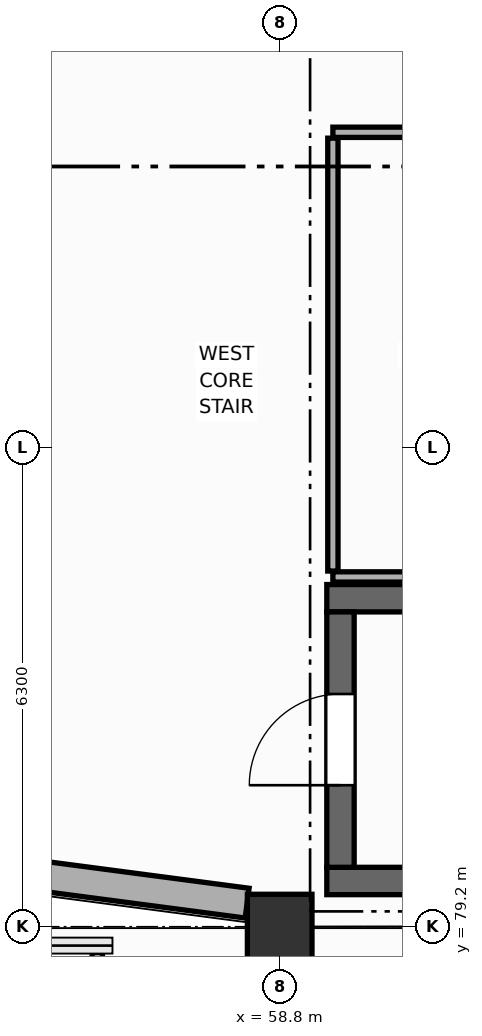
"""IFC4 building model, lengths in metres.
Left out: names, types, materials, properties, quantities, classifications, styles, units other than length and angle.
Written with IfcOpenShell. Run it as: python <this file> out.ifc"""

import sys

from ifc_helpers import new_model, si_unit, direction, frame, frame_2d, origin, origin_2d, place, context, subcontext, project, spatial, rectangle, extrude, element, fill, save


model = new_model("IFC4")
c1 = context("Model", 3, precision=1e-05, world=origin(), true_north=direction((0.0, 1.0)))
c2 = subcontext(c1, "Body", "Model", "MODEL_VIEW")
j1 = project(units=[si_unit("LENGTHUNIT", "METRE"), si_unit("PLANEANGLEUNIT", "RADIAN")], contexts=[c1])
p1 = place(None, origin())
s1 = spatial("IfcSite", under=j1, at=p1, CompositionType="ELEMENT")
p2 = place(p1, origin())
s2 = spatial("IfcBuilding", under=s1, at=p2, CompositionType="ELEMENT")
p3 = place(p2, origin())
s3 = spatial("IfcBuildingStorey", under=s2, at=p3, CompositionType="ELEMENT", Elevation=0.0)
p4 = place(p3, frame((58.8, 79.2, 0.0), z_axis=(0.0, 0.0, 1.0), x_axis=(1.0, 0.0, 0.0)))
e1 = element("IfcColumn", 1, at=p4, inside=s3, PredefinedType="COLUMN", context=c2, shape_type="SweptSolid", body=[
    extrude(rectangle(XDim=0.85, YDim=0.85, at=origin_2d()), origin(), (0.0, 0.0, 1.0), 5.4),
])
p5 = place(p3, frame((55.572, 79.877, 0.0), z_axis=(0.0, 0.0, 1.0), x_axis=(0.991443994311, -0.130532778046, 0.0)))
e2 = element("IfcWall", 2, at=p5, inside=s3, PredefinedType="ELEMENTEDWALL", context=c2, shape_type="SweptSolid", body=[
    extrude(rectangle(XDim=2.824, YDim=0.395, at=frame_2d((1.412, 0.0))), origin(), (0.0, 0.0, 1.0), 4.27),
])
for number, where, z_axis, x_axis in (
    (3, (59.42, 83.52, 0.0), (0.0, 0.0, 1.0), (1.0, 0.0, 0.0)),
    (4, (68.78, 79.8, 0.0), (0.0, 0.0, 1.0), (-1.0, 0.0, 0.0)),
):
    element("IfcWall", number, at=place(p3, frame(where, z_axis=z_axis, x_axis=x_axis)), inside=s3, PredefinedType="SHEAR", context=c2, shape_type="SweptSolid", body=[
        extrude(rectangle(XDim=9.36, YDim=0.36, at=frame_2d((4.68, 0.0))), origin(), (0.0, 0.0, 1.0), 5.14),
    ])
p6 = place(p3, frame((59.6, 79.98, 0.0), z_axis=(0.0, 0.0, 1.0), x_axis=(0.0, 1.0, 0.0)))
e5 = element("IfcWall", 5, at=p6, inside=s3, PredefinedType="SHEAR", context=c2, shape_type="SweptSolid", body=[
    extrude(rectangle(XDim=3.36, YDim=0.36, at=frame_2d((1.68, 0.0))), origin(), (0.0, 0.0, 1.0), 5.14),
])
p7 = place(p6, frame((1.08, 0.0, 0.0)))
e6 = element("IfcOpeningElement", 6, at=p7, cuts=e5, PredefinedType="OPENING", context=c2, shape_type="SweptSolid", body=[
    extrude(rectangle(XDim=1.2, YDim=2.2, at=frame_2d((0.6, 1.1))), frame((0.0, 0.19, 0.0), z_axis=(0.0, -1.0, 0.0), x_axis=(1.0, 0.0, 0.0)), (0.0, 0.0, 1.0), 0.38),
])
p8 = place(p3, frame((59.5, 89.65, 0.0), z_axis=(0.0, 0.0, 1.0), x_axis=(1.0, 0.0, 0.0)))
e7 = element("IfcWall", 7, at=p8, inside=s3, PredefinedType="PARTITIONING", context=c2, shape_type="SweptSolid", body=[
    extrude(rectangle(XDim=3.5, YDim=0.135, at=frame_2d((1.75, 0.0))), origin(), (0.0, 0.0, 1.0), 5.125),
])
p9 = place(p8, frame((1.275, 0.0, 0.0)))
e8 = element("IfcOpeningElement", 8, at=p9, cuts=e7, PredefinedType="OPENING", context=c2, shape_type="SweptSolid", body=[
    extrude(rectangle(XDim=0.95, YDim=2.15, at=frame_2d((0.475, 1.075))), frame((0.0, 0.077, 0.0), z_axis=(0.0, -1.0, 0.0), x_axis=(1.0, 0.0, 0.0)), (0.0, 0.0, 1.0), 0.155),
])
p10 = place(p3, frame((63.0, 83.8, 0.0), z_axis=(0.0, 0.0, 1.0), x_axis=(-1.0, 0.0, 0.0)))
e9 = element("IfcWall", 9, at=p10, inside=s3, PredefinedType="PARTITIONING", context=c2, shape_type="SweptSolid", body=[
    extrude(rectangle(XDim=3.5, YDim=0.135, at=frame_2d((1.75, 0.0))), origin(), (0.0, 0.0, 1.0), 5.125),
])
p11 = place(p3, frame((59.5, 83.877, 0.0), z_axis=(0.0, 0.0, 1.0), x_axis=(0.0, 1.0, 0.0)))
e10 = element("IfcWall", 10, at=p11, inside=s3, PredefinedType="PARTITIONING", context=c2, shape_type="SweptSolid", body=[
    extrude(rectangle(XDim=5.695, YDim=0.135, at=frame_2d((2.848, 0.0))), origin(), (0.0, 0.0, 1.0), 5.125),
])
p12 = place(p3, frame((56.4, 78.86, 0.0), z_axis=(0.0, 0.0, 1.0), x_axis=(0.0, -1.0, 0.0)))
e11 = element("IfcWall", 11, at=p12, inside=s3, PredefinedType="PARTITIONING", context=c2, shape_type="SweptSolid", body=[
    extrude(rectangle(XDim=7.983, YDim=0.135, at=frame_2d((3.991, 0.0))), origin(), (0.0, 0.0, 1.0), 4.23),
])
p13 = place(p7, origin())
e12 = element("IfcDoor", 12, at=p13, inside=s3, OperationType="SINGLE_SWING_LEFT", PredefinedType="DOOR", context=c2, shape_type="SweptSolid", body=[
    extrude(rectangle(XDim=1.2, YDim=2.2, at=frame_2d((0.6, 1.1))), frame((0.0, 0.025, 0.0), z_axis=(0.0, -1.0, 0.0), x_axis=(1.0, 0.0, 0.0)), (0.0, 0.0, 1.0), 0.05),
])
fill(e6, e12)
save(model, sys.argv[1])
